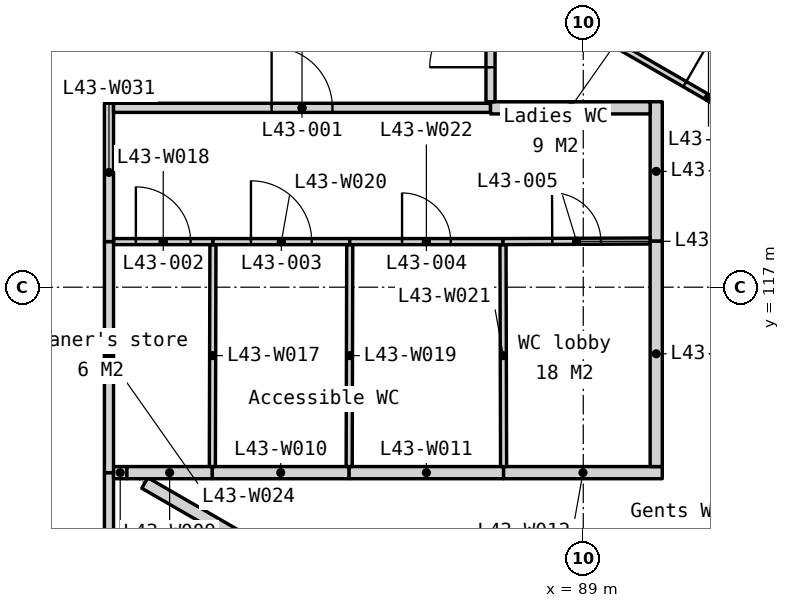
"""IFC4 building model, lengths in metres.
Left out: names, types, materials, properties, quantities, classifications, styles, units other than length and angle.
Written with IfcOpenShell. Run it as: python <this file> out.ifc"""

import sys

from ifc_helpers import new_model, si_unit, direction, frame, frame_2d, origin, place, context, subcontext, project, spatial, polyline, rectangle, outline, extrude, element, fill, save


model = new_model("IFC4")
c1 = context("Model", 3, precision=1e-05, world=origin(), true_north=direction((0.0, 1.0)))
c2 = subcontext(c1, "Body", "Model", "MODEL_VIEW")
j1 = project(units=[si_unit("LENGTHUNIT", "METRE"), si_unit("PLANEANGLEUNIT", "RADIAN")], contexts=[c1])
p1 = place(None, origin())
s1 = spatial("IfcSite", under=j1, at=p1, CompositionType="ELEMENT")
p2 = place(p1, origin())
s2 = spatial("IfcBuilding", under=s1, at=p2, CompositionType="ELEMENT")
p3 = place(p2, frame((0.0, 0.0, 171.5)))
s3 = spatial("IfcBuildingStorey", under=s2, at=p3, CompositionType="ELEMENT", Elevation=171.5)
p4 = place(p3, frame((82.105, 96.067, -0.15), z_axis=(0.0, 0.0, 1.0), x_axis=(0.499997369791, 0.866026922331, 0.0)))
e1 = element("IfcWall", 1, at=p4, inside=s3, PredefinedType="SOLIDWALL", context=c2, shape_type="SweptSolid", body=[
    extrude(outline(polyline([(40.486, 0.0), (40.486, 3.8), (0.0, 3.8), (0.0, 0.0), (40.486, 0.0)])), frame((0.0, 0.225, 0.0), z_axis=(0.0, -1.0, 0.0), x_axis=(1.0, 0.0, 0.0)), (0.0, 0.0, 1.0), 0.45),
])
p5 = place(p4, frame((3.011, 0.0, 0.95)))
e2 = element("IfcOpeningElement", 2, at=p5, cuts=e1, PredefinedType="OPENING", context=c2, shape_type="SweptSolid", body=[
    extrude(rectangle(XDim=1.8, YDim=2.2, at=frame_2d((0.9, 1.1))), frame((0.0, 0.235, 0.0), z_axis=(0.0, -1.0, 0.0), x_axis=(1.0, 0.0, 0.0)), (0.0, 0.0, 1.0), 0.47),
])
p6 = place(p4, frame((5.311, 0.0, 0.95)))
e3 = element("IfcOpeningElement", 3, at=p6, cuts=e1, PredefinedType="OPENING", context=c2, shape_type="SweptSolid", body=[
    extrude(rectangle(XDim=1.8, YDim=2.2, at=frame_2d((0.9, 1.1))), frame((0.0, 0.235, 0.0), z_axis=(0.0, -1.0, 0.0), x_axis=(1.0, 0.0, 0.0)), (0.0, 0.0, 1.0), 0.47),
])
p7 = place(p4, frame((13.132, 0.0, 0.95)))
e4 = element("IfcOpeningElement", 4, at=p7, cuts=e1, PredefinedType="OPENING", context=c2, shape_type="SweptSolid", body=[
    extrude(rectangle(XDim=1.8, YDim=2.2, at=frame_2d((0.9, 1.1))), frame((0.0, 0.235, 0.0), z_axis=(0.0, -1.0, 0.0), x_axis=(1.0, 0.0, 0.0)), (0.0, 0.0, 1.0), 0.47),
])
p8 = place(p4, frame((15.432, 0.0, 0.95)))
e5 = element("IfcOpeningElement", 5, at=p8, cuts=e1, PredefinedType="OPENING", context=c2, shape_type="SweptSolid", body=[
    extrude(rectangle(XDim=1.8, YDim=2.2, at=frame_2d((0.9, 1.1))), frame((0.0, 0.235, 0.0), z_axis=(0.0, -1.0, 0.0), x_axis=(1.0, 0.0, 0.0)), (0.0, 0.0, 1.0), 0.47),
])
p9 = place(p4, frame((23.254, 0.0, 0.95)))
e6 = element("IfcOpeningElement", 6, at=p9, cuts=e1, PredefinedType="OPENING", context=c2, shape_type="SweptSolid", body=[
    extrude(rectangle(XDim=1.8, YDim=2.2, at=frame_2d((0.9, 1.1))), frame((0.0, 0.235, 0.0), z_axis=(0.0, -1.0, 0.0), x_axis=(1.0, 0.0, 0.0)), (0.0, 0.0, 1.0), 0.47),
])
p10 = place(p4, frame((25.554, 0.0, 0.95)))
e7 = element("IfcOpeningElement", 7, at=p10, cuts=e1, PredefinedType="OPENING", context=c2, shape_type="SweptSolid", body=[
    extrude(rectangle(XDim=1.8, YDim=2.2, at=frame_2d((0.9, 1.1))), frame((0.0, 0.235, 0.0), z_axis=(0.0, -1.0, 0.0), x_axis=(1.0, 0.0, 0.0)), (0.0, 0.0, 1.0), 0.47),
])
p11 = place(p4, frame((33.375, 0.0, 0.95)))
e8 = element("IfcOpeningElement", 8, at=p11, cuts=e1, PredefinedType="OPENING", context=c2, shape_type="SweptSolid", body=[
    extrude(rectangle(XDim=1.8, YDim=2.2, at=frame_2d((0.9, 1.1))), frame((0.0, 0.235, 0.0), z_axis=(0.0, -1.0, 0.0), x_axis=(1.0, 0.0, 0.0)), (0.0, 0.0, 1.0), 0.47),
])
p12 = place(p4, frame((35.675, 0.0, 0.95)))
e9 = element("IfcOpeningElement", 9, at=p12, cuts=e1, PredefinedType="OPENING", context=c2, shape_type="SweptSolid", body=[
    extrude(rectangle(XDim=1.8, YDim=2.2, at=frame_2d((0.9, 1.1))), frame((0.0, 0.235, 0.0), z_axis=(0.0, -1.0, 0.0), x_axis=(1.0, 0.0, 0.0)), (0.0, 0.0, 1.0), 0.47),
])
p13 = place(p3, frame((81.2, 110.388, 0.0), z_axis=(0.0, 0.0, 1.0), x_axis=(0.0, 1.0, 0.0)))
e10 = element("IfcWall", 10, at=p13, inside=s3, PredefinedType="PARTITIONING", context=c2, shape_type="SweptSolid", body=[
    extrude(rectangle(XDim=3.562, YDim=0.15, at=frame_2d((1.781, 0.0))), origin(), (0.0, 0.0, 1.0), 3.65),
])
p14 = place(p3, frame((81.275, 113.95, 0.0), z_axis=(0.0, 0.0, 1.0), x_axis=(1.0, 0.0, 0.0)))
e11 = element("IfcWall", 11, at=p14, inside=s3, PredefinedType="PARTITIONING", context=c2, shape_type="SweptSolid", body=[
    extrude(rectangle(XDim=0.22, YDim=0.2, at=frame_2d((0.11, 0.0))), origin(), (0.0, 0.0, 1.0), 3.65),
])
p15 = place(p3, frame((81.79, 113.78, 0.0), z_axis=(0.0, 0.0, 1.0), x_axis=(0.866017572094, -0.50001356464, 0.0)))
e12 = element("IfcWall", 12, at=p15, inside=s3, PredefinedType="PARTITIONING", context=c2, shape_type="SweptSolid", body=[
    extrude(rectangle(XDim=8.905, YDim=0.2, at=frame_2d((4.453, 0.0))), origin(), (0.0, 0.0, 1.0), 3.65),
])
p16 = place(p3, frame((81.495, 113.95, 0.0), z_axis=(0.0, 0.0, 1.0), x_axis=(1.0, 0.0, 0.0)))
e13 = element("IfcWall", 13, at=p16, inside=s3, PredefinedType="PARTITIONING", context=c2, shape_type="SweptSolid", body=[
    extrude(rectangle(XDim=1.405, YDim=0.2, at=frame_2d((0.702, 0.0))), origin(), (0.0, 0.0, 1.0), 3.65),
])
p17 = place(p3, frame((82.9, 113.95, 0.0), z_axis=(0.0, 0.0, 1.0), x_axis=(1.0, 0.0, 0.0)))
e14 = element("IfcWall", 14, at=p17, inside=s3, PredefinedType="PARTITIONING", context=c2, shape_type="SweptSolid", body=[
    extrude(rectangle(XDim=2.25, YDim=0.2, at=frame_2d((1.125, 0.0))), origin(), (0.0, 0.0, 1.0), 3.65),
])
p18 = place(p3, frame((85.15, 113.95, 0.0), z_axis=(0.0, 0.0, 1.0), x_axis=(1.0, 0.0, 0.0)))
e15 = element("IfcWall", 15, at=p18, inside=s3, PredefinedType="PARTITIONING", context=c2, shape_type="SweptSolid", body=[
    extrude(rectangle(XDim=2.54, YDim=0.2, at=frame_2d((1.27, 0.0))), origin(), (0.0, 0.0, 1.0), 3.65),
])
p19 = place(p3, frame((87.69, 113.95, 0.0), z_axis=(0.0, 0.0, 1.0), x_axis=(1.0, 0.0, 0.0)))
e16 = element("IfcWall", 16, at=p19, inside=s3, PredefinedType="PARTITIONING", context=c2, shape_type="SweptSolid", body=[
    extrude(rectangle(XDim=2.61, YDim=0.2, at=frame_2d((1.305, 0.0))), origin(), (0.0, 0.0, 1.0), 3.65),
])
p20 = place(p3, frame((90.2, 114.05, 0.0), z_axis=(0.0, 0.0, 1.0), x_axis=(0.0, 1.0, 0.0)))
e17 = element("IfcWall", 17, at=p20, inside=s3, PredefinedType="PARTITIONING", context=c2, shape_type="SweptSolid", body=[
    extrude(rectangle(XDim=3.71, YDim=0.2, at=frame_2d((1.855, 0.0))), origin(), (0.0, 0.0, 1.0), 3.65),
])
p21 = place(p3, frame((90.2, 117.76, 0.0), z_axis=(0.0, 0.0, 1.0), x_axis=(0.0, 1.0, 0.0)))
e18 = element("IfcWall", 18, at=p21, inside=s3, PredefinedType="PARTITIONING", context=c2, shape_type="SweptSolid", body=[
    extrude(rectangle(XDim=2.29, YDim=0.2, at=frame_2d((1.145, 0.0))), origin(), (0.0, 0.0, 1.0), 3.65),
])
p22 = place(p3, frame((82.9, 114.05, 0.0), z_axis=(0.0, 0.0, 1.0), x_axis=(0.002675575707, 0.999996420641, 0.0)))
e19 = element("IfcWall", 19, at=p22, inside=s3, PredefinedType="PARTITIONING", context=c2, shape_type="SweptSolid", body=[
    extrude(rectangle(XDim=3.65, YDim=0.1, at=frame_2d((1.825, 0.0))), origin(), (0.0, 0.0, 1.0), 3.65),
])
p23 = place(p3, frame((81.275, 117.75, 0.0), z_axis=(0.0, 0.0, 1.0), x_axis=(1.0, 0.0, 0.0)))
e20 = element("IfcWall", 20, at=p23, inside=s3, PredefinedType="PARTITIONING", context=c2, shape_type="SweptSolid", body=[
    extrude(rectangle(XDim=1.635, YDim=0.1, at=frame_2d((0.817, 0.0))), origin(), (0.0, 0.0, 1.0), 3.65),
])
p24 = place(p23, frame((0.367, 0.0, 0.0)))
e21 = element("IfcOpeningElement", 21, at=p24, cuts=e20, PredefinedType="OPENING", context=c2, shape_type="SweptSolid", body=[
    extrude(rectangle(XDim=0.9, YDim=2.1, at=frame_2d((0.45, 1.05))), frame((0.0, 0.06, 0.0), z_axis=(0.0, -1.0, 0.0), x_axis=(1.0, 0.0, 0.0)), (0.0, 0.0, 1.0), 0.12),
])
p25 = place(p3, frame((85.15, 114.05, 0.0), z_axis=(0.0, 0.0, 1.0), x_axis=(0.002675575707, 0.999996420641, 0.0)))
e22 = element("IfcWall", 22, at=p25, inside=s3, PredefinedType="PARTITIONING", context=c2, shape_type="SweptSolid", body=[
    extrude(rectangle(XDim=3.65, YDim=0.1, at=frame_2d((1.825, 0.0))), origin(), (0.0, 0.0, 1.0), 3.65),
])
p26 = place(p3, frame((82.91, 117.75, 0.0), z_axis=(0.0, 0.0, 1.0), x_axis=(1.0, 0.0, 0.0)))
e23 = element("IfcWall", 23, at=p26, inside=s3, PredefinedType="PARTITIONING", context=c2, shape_type="SweptSolid", body=[
    extrude(rectangle(XDim=2.25, YDim=0.1, at=frame_2d((1.125, 0.0))), origin(), (0.0, 0.0, 1.0), 3.65),
])
p27 = place(p26, frame((0.625, 0.0, 0.0)))
e24 = element("IfcOpeningElement", 24, at=p27, cuts=e23, PredefinedType="OPENING", context=c2, shape_type="SweptSolid", body=[
    extrude(rectangle(XDim=1.0, YDim=2.1, at=frame_2d((0.5, 1.05))), frame((0.0, 0.06, 0.0), z_axis=(0.0, -1.0, 0.0), x_axis=(1.0, 0.0, 0.0)), (0.0, 0.0, 1.0), 0.12),
])
p28 = place(p3, frame((87.69, 114.05, 0.0), z_axis=(0.0, 0.0, 1.0), x_axis=(-0.002608686776, 0.999996597371, 0.0)))
e25 = element("IfcWall", 25, at=p28, inside=s3, PredefinedType="PARTITIONING", context=c2, shape_type="SweptSolid", body=[
    extrude(rectangle(XDim=3.65, YDim=0.1, at=frame_2d((1.825, 0.0))), origin(), (0.0, 0.0, 1.0), 3.65),
])
p29 = place(p3, frame((85.16, 117.75, 0.0), z_axis=(0.0, 0.0, 1.0), x_axis=(1.0, 0.0, 0.0)))
e26 = element("IfcWall", 26, at=p29, inside=s3, PredefinedType="PARTITIONING", context=c2, shape_type="SweptSolid", body=[
    extrude(rectangle(XDim=2.52, YDim=0.1, at=frame_2d((1.26, 0.0))), origin(), (0.0, 0.0, 1.0), 3.65),
])
p30 = place(p29, frame((0.86, 0.0, 0.0)))
e27 = element("IfcOpeningElement", 27, at=p30, cuts=e26, PredefinedType="OPENING", context=c2, shape_type="SweptSolid", body=[
    extrude(rectangle(XDim=0.8, YDim=2.1, at=frame_2d((0.4, 1.05))), frame((0.0, 0.06, 0.0), z_axis=(0.0, -1.0, 0.0), x_axis=(1.0, 0.0, 0.0)), (0.0, 0.0, 1.0), 0.12),
])
p31 = place(p3, frame((87.68, 117.75, 0.0), z_axis=(0.0, 0.0, 1.0), x_axis=(0.999992261016, 0.003934197335, 0.0)))
e28 = element("IfcWall", 28, at=p31, inside=s3, PredefinedType="PARTITIONING", context=c2, shape_type="SweptSolid", body=[
    extrude(rectangle(XDim=2.42, YDim=0.1, at=frame_2d((1.21, 0.0))), origin(), (0.0, 0.0, 1.0), 3.65),
])
p32 = place(p31, frame((0.81, 0.0, 0.0)))
e29 = element("IfcOpeningElement", 29, at=p32, cuts=e28, PredefinedType="OPENING", context=c2, shape_type="SweptSolid", body=[
    extrude(rectangle(XDim=0.8, YDim=2.1, at=frame_2d((0.4, 1.05))), frame((0.0, 0.06, 0.0), z_axis=(0.0, -1.0, 0.0), x_axis=(1.0, 0.0, 0.0)), (0.0, 0.0, 1.0), 0.12),
])
p33 = place(p3, frame((81.2, 113.95, 0.0), z_axis=(0.0, 0.0, 1.0), x_axis=(0.0, 1.0, 0.0)))
e30 = element("IfcWall", 30, at=p33, inside=s3, PredefinedType="PARTITIONING", context=c2, shape_type="SweptSolid", body=[
    extrude(rectangle(XDim=3.8, YDim=0.15, at=frame_2d((1.9, 0.0))), origin(), (0.0, 0.0, 1.0), 3.65),
])
p34 = place(p3, frame((87.557, 122.137, 0.0), z_axis=(0.0, 0.0, 1.0), x_axis=(0.866029768103, -0.499992440702, 0.0)))
e31 = element("IfcWall", 31, at=p34, inside=s3, PredefinedType="PARTITIONING", context=c2, shape_type="SweptSolid", body=[
    extrude(rectangle(XDim=8.089, YDim=0.1, at=frame_2d((4.044, 0.0))), origin(), (0.0, 0.0, 1.0), 3.65),
])
p35 = place(p34, frame((3.594, 0.0, 0.0)))
e32 = element("IfcOpeningElement", 32, at=p35, cuts=e31, PredefinedType="OPENING", context=c2, shape_type="SweptSolid", body=[
    extrude(rectangle(XDim=0.9, YDim=2.1, at=frame_2d((0.45, 1.05))), frame((0.0, 0.06, 0.0), z_axis=(0.0, -1.0, 0.0), x_axis=(1.0, 0.0, 0.0)), (0.0, 0.0, 1.0), 0.12),
])
p36 = place(p3, frame((81.2, 117.75, 0.0), z_axis=(0.0, 0.0, 1.0), x_axis=(0.0, 1.0, 0.0)))
e33 = element("IfcWall", 33, at=p36, inside=s3, PredefinedType="PARTITIONING", context=c2, shape_type="SweptSolid", body=[
    extrude(rectangle(XDim=2.275, YDim=0.15, at=frame_2d((1.137, 0.0))), origin(), (0.0, 0.0, 1.0), 3.65),
])
p37 = place(p3, frame((81.275, 119.95, 0.0), z_axis=(0.0, 0.0, 1.0), x_axis=(1.0, 0.0, 0.0)))
e34 = element("IfcWall", 34, at=p37, inside=s3, PredefinedType="PARTITIONING", context=c2, shape_type="SweptSolid", body=[
    extrude(rectangle(XDim=6.2, YDim=0.15, at=frame_2d((3.1, 0.0))), origin(), (0.0, 0.0, 1.0), 3.65),
])
p38 = place(p37, frame((2.6, 0.0, 0.0)))
e35 = element("IfcOpeningElement", 35, at=p38, cuts=e34, PredefinedType="OPENING", context=c2, shape_type="SweptSolid", body=[
    extrude(rectangle(XDim=1.0, YDim=2.1, at=frame_2d((0.5, 1.05))), frame((0.0, 0.085, 0.0), z_axis=(0.0, -1.0, 0.0), x_axis=(1.0, 0.0, 0.0)), (0.0, 0.0, 1.0), 0.17),
])
p39 = place(p3, frame((87.475, 119.95, 0.0), z_axis=(0.0, 0.0, 1.0), x_axis=(1.0, 0.0, 0.0)))
e36 = element("IfcWall", 36, at=p39, inside=s3, PredefinedType="PARTITIONING", context=c2, shape_type="SweptSolid", body=[
    extrude(rectangle(XDim=2.625, YDim=0.2, at=frame_2d((1.312, 0.0))), origin(), (0.0, 0.0, 1.0), 3.65),
])
p40 = place(p3, frame((87.475, 120.05, 0.0), z_axis=(0.0, 0.0, 1.0), x_axis=(0.0, 1.0, 0.0)))
e37 = element("IfcWall", 37, at=p40, inside=s3, PredefinedType="PARTITIONING", context=c2, shape_type="SweptSolid", body=[
    extrude(rectangle(XDim=2.135, YDim=0.15, at=frame_2d((1.067, 0.0))), origin(), (0.0, 0.0, 1.0), 3.65),
])
p41 = place(p40, frame((0.567, 0.0, 0.0)))
e38 = element("IfcOpeningElement", 38, at=p41, cuts=e37, PredefinedType="OPENING", context=c2, shape_type="SweptSolid", body=[
    extrude(rectangle(XDim=1.0, YDim=2.1, at=frame_2d((0.5, 1.05))), frame((0.0, 0.085, 0.0), z_axis=(0.0, -1.0, 0.0), x_axis=(1.0, 0.0, 0.0)), (0.0, 0.0, 1.0), 0.17),
])
p42 = place(p38, origin())
e39 = element("IfcDoor", 39, at=p42, inside=s3, OperationType="SINGLE_SWING_LEFT", PredefinedType="DOOR", context=c2, shape_type="SweptSolid", body=[
    extrude(rectangle(XDim=1.0, YDim=2.1, at=frame_2d((0.5, 1.05))), frame((0.0, 0.025, 0.0), z_axis=(0.0, -1.0, 0.0), x_axis=(1.0, 0.0, 0.0)), (0.0, 0.0, 1.0), 0.05),
])
fill(e35, e39)
p43 = place(p24, origin())
e40 = element("IfcDoor", 40, at=p43, inside=s3, OperationType="SINGLE_SWING_LEFT", PredefinedType="DOOR", context=c2, shape_type="SweptSolid", body=[
    extrude(rectangle(XDim=0.9, YDim=2.1, at=frame_2d((0.45, 1.05))), frame((0.0, 0.025, 0.0), z_axis=(0.0, -1.0, 0.0), x_axis=(1.0, 0.0, 0.0)), (0.0, 0.0, 1.0), 0.05),
])
fill(e21, e40)
p44 = place(p27, origin())
e41 = element("IfcDoor", 41, at=p44, inside=s3, OperationType="SINGLE_SWING_LEFT", PredefinedType="DOOR", context=c2, shape_type="SweptSolid", body=[
    extrude(rectangle(XDim=1.0, YDim=2.1, at=frame_2d((0.5, 1.05))), frame((0.0, 0.025, 0.0), z_axis=(0.0, -1.0, 0.0), x_axis=(1.0, 0.0, 0.0)), (0.0, 0.0, 1.0), 0.05),
])
fill(e24, e41)
p45 = place(p30, origin())
e42 = element("IfcDoor", 42, at=p45, inside=s3, OperationType="SINGLE_SWING_LEFT", PredefinedType="DOOR", context=c2, shape_type="SweptSolid", body=[
    extrude(rectangle(XDim=0.8, YDim=2.1, at=frame_2d((0.4, 1.05))), frame((0.0, 0.025, 0.0), z_axis=(0.0, -1.0, 0.0), x_axis=(1.0, 0.0, 0.0)), (0.0, 0.0, 1.0), 0.05),
])
fill(e27, e42)
p46 = place(p32, origin())
e43 = element("IfcDoor", 43, at=p46, inside=s3, OperationType="SINGLE_SWING_LEFT", PredefinedType="DOOR", context=c2, shape_type="SweptSolid", body=[
    extrude(rectangle(XDim=0.8, YDim=2.1, at=frame_2d((0.4, 1.05))), frame((0.0, 0.025, 0.0), z_axis=(0.0, -1.0, 0.0), x_axis=(1.0, 0.0, 0.0)), (0.0, 0.0, 1.0), 0.05),
])
fill(e29, e43)
p47 = place(p41, origin())
e44 = element("IfcDoor", 44, at=p47, inside=s3, OperationType="SINGLE_SWING_LEFT", PredefinedType="DOOR", context=c2, shape_type="SweptSolid", body=[
    extrude(rectangle(XDim=1.0, YDim=2.1, at=frame_2d((0.5, 1.05))), frame((0.0, 0.025, 0.0), z_axis=(0.0, -1.0, 0.0), x_axis=(1.0, 0.0, 0.0)), (0.0, 0.0, 1.0), 0.05),
])
fill(e38, e44)
p48 = place(p35, origin())
e45 = element("IfcDoor", 45, at=p48, inside=s3, OperationType="SINGLE_SWING_LEFT", PredefinedType="DOOR", context=c2, shape_type="SweptSolid", body=[
    extrude(rectangle(XDim=0.9, YDim=2.1, at=frame_2d((0.45, 1.05))), frame((0.0, 0.025, 0.0), z_axis=(0.0, -1.0, 0.0), x_axis=(1.0, 0.0, 0.0)), (0.0, 0.0, 1.0), 0.05),
])
fill(e32, e45)
save(model, sys.argv[1])
